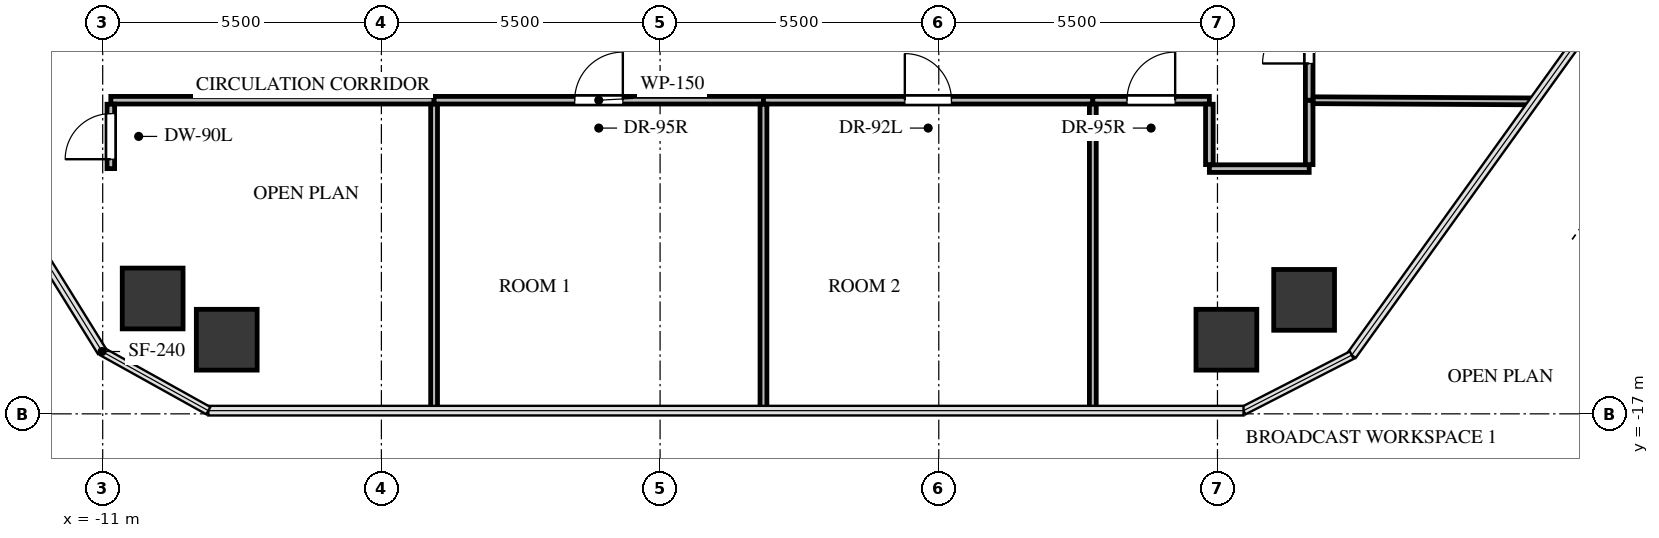
"""IFC4 building model, lengths in metres.
Left out: names, types, materials, properties, quantities, classifications, styles, units other than length and angle.
Written with IfcOpenShell. Run it as: python <this file> out.ifc"""

import sys

from ifc_helpers import new_model, si_unit, direction, frame, frame_2d, origin, origin_2d, place, context, subcontext, project, spatial, rectangle, extrude, source, transform, mapped, element, fill, save


model = new_model("IFC4")
c1 = context("Model", 3, precision=1e-05, world=origin(), true_north=direction((0.0, 1.0)))
c2 = subcontext(c1, "Body", "Model", "MODEL_VIEW")
j1 = project(units=[si_unit("LENGTHUNIT", "METRE"), si_unit("PLANEANGLEUNIT", "RADIAN")], contexts=[c1])
p1 = place(None, origin())
s1 = spatial("IfcSite", under=j1, at=p1, CompositionType="ELEMENT")
p2 = place(p1, origin())
s2 = spatial("IfcBuilding", under=s1, at=p2, CompositionType="ELEMENT")
p3 = place(p2, frame((0.0, 0.0, 114.0)))
s3 = spatial("IfcBuildingStorey", under=s2, at=p3, CompositionType="ELEMENT", Elevation=114.0)
m1 = source(origin(), c2, "Body", "SweptSolid", [
    extrude(rectangle(XDim=1.2, YDim=1.2, at=origin_2d()), origin(), (0.0, 0.0, 1.0), 3.3),
])
for number, where, z_axis, x_axis in (
    (1, (-10.014, -14.723, -0.24), (0.0, 0.0, 1.0), (1.0, 0.0, 0.0)),
    (2, (12.71, -14.75, -0.24), (0.0, 0.0, 1.0), (1.0, 0.0, 0.0)),
    (3, (11.176, -15.537, -0.24), (0.0, 0.0, 1.0), (1.0, 0.0, 0.0)),
    (4, (-8.552, -15.537, -0.24), (0.0, 0.0, 1.0), (1.0, 0.0, 0.0)),
):
    element("IfcColumn", number, at=place(p3, frame(where, z_axis=z_axis, x_axis=x_axis)), inside=s3, PredefinedType="COLUMN", context=c2, shape_type="MappedRepresentation", body=[
        mapped(m1, transform((0.0, 0.0, 0.0), x_axis=(1.0, 0.0, 0.0), y_axis=(0.0, 1.0, 0.0), z_axis=(0.0, 0.0, 1.0), scale=1.0)),
    ])
p4 = place(p3, frame((-10.84, -10.81, 0.0), z_axis=(0.0, 0.0, 1.0), x_axis=(1.0, 0.0, 0.0)))
e5 = element("IfcWall", 5, at=p4, inside=s3, PredefinedType="PARTITIONING", context=c2, shape_type="SweptSolid", body=[
    extrude(rectangle(XDim=6.38, YDim=0.15, at=frame_2d((3.19, 0.0))), origin(), (0.0, 0.0, 1.0), 2.212),
])
p5 = place(p3, frame((-10.84, -12.16, 0.0), z_axis=(0.0, 0.0, 1.0), x_axis=(0.0, 1.0, 0.0)))
e6 = element("IfcWall", 6, at=p5, inside=s3, PredefinedType="PARTITIONING", context=c2, shape_type="SweptSolid", body=[
    extrude(rectangle(XDim=1.271, YDim=0.15, at=frame_2d((0.635, 0.0))), origin(), (0.0, 0.0, 1.0), 3.045),
])
p6 = place(p5, frame((0.186, 0.0, 0.0)))
e7 = element("IfcOpeningElement", 7, at=p6, cuts=e6, PredefinedType="OPENING", context=c2, shape_type="SweptSolid", body=[
    extrude(rectangle(XDim=0.9, YDim=2.05, at=frame_2d((0.45, 1.025))), frame((0.0, 0.085, 0.0), z_axis=(0.0, -1.0, 0.0), x_axis=(1.0, 0.0, 0.0)), (0.0, 0.0, 1.0), 0.17),
])
p7 = place(p3, frame((-4.46, -10.81, 0.0), z_axis=(0.0, 0.0, 1.0), x_axis=(1.0, 0.0, 0.0)))
e8 = element("IfcWall", 8, at=p7, inside=s3, PredefinedType="PARTITIONING", context=c2, shape_type="SweptSolid", body=[
    extrude(rectangle(XDim=6.5, YDim=0.15, at=frame_2d((3.25, 0.0))), origin(), (0.0, 0.0, 1.0), 3.045),
])
p8 = place(p7, frame((2.775, 0.0, 0.0)))
e9 = element("IfcOpeningElement", 9, at=p8, cuts=e8, PredefinedType="OPENING", context=c2, shape_type="SweptSolid", body=[
    extrude(rectangle(XDim=0.95, YDim=2.1, at=frame_2d((0.475, 1.05))), frame((0.0, 0.085, 0.0), z_axis=(0.0, -1.0, 0.0), x_axis=(1.0, 0.0, 0.0)), (0.0, 0.0, 1.0), 0.17),
])
p9 = place(p3, frame((2.04, -10.81, 0.0), z_axis=(0.0, 0.0, 1.0), x_axis=(1.0, 0.0, 0.0)))
e10 = element("IfcWall", 10, at=p9, inside=s3, PredefinedType="PARTITIONING", context=c2, shape_type="SweptSolid", body=[
    extrude(rectangle(XDim=6.5, YDim=0.15, at=frame_2d((3.25, 0.0))), origin(), (0.0, 0.0, 1.0), 2.212),
])
p10 = place(p9, frame((2.79, 0.0, 0.0)))
e11 = element("IfcOpeningElement", 11, at=p10, cuts=e10, PredefinedType="OPENING", context=c2, shape_type="SweptSolid", body=[
    extrude(rectangle(XDim=0.92, YDim=2.1, at=frame_2d((0.46, 1.05))), frame((0.0, 0.085, 0.0), z_axis=(0.0, -1.0, 0.0), x_axis=(1.0, 0.0, 0.0)), (0.0, 0.0, 1.0), 0.17),
])
p11 = place(p3, frame((8.54, -10.81, 0.0), z_axis=(0.0, 0.0, 1.0), x_axis=(1.0, 0.0, 0.0)))
e12 = element("IfcWall", 12, at=p11, inside=s3, PredefinedType="PARTITIONING", context=c2, shape_type="SweptSolid", body=[
    extrude(rectangle(XDim=2.3, YDim=0.15, at=frame_2d((1.15, 0.0))), origin(), (0.0, 0.0, 1.0), 3.045),
])
p12 = place(p11, frame((0.675, 0.0, 0.0)))
e13 = element("IfcOpeningElement", 13, at=p12, cuts=e12, PredefinedType="OPENING", context=c2, shape_type="SweptSolid", body=[
    extrude(rectangle(XDim=0.95, YDim=2.1, at=frame_2d((0.475, 1.05))), frame((0.0, 0.085, 0.0), z_axis=(0.0, -1.0, 0.0), x_axis=(1.0, 0.0, 0.0)), (0.0, 0.0, 1.0), 0.17),
])
p13 = place(p3, frame((10.84, -12.16, 0.0), z_axis=(0.0, 0.0, 1.0), x_axis=(1.0, 0.0, 0.0)))
e14 = element("IfcWall", 14, at=p13, inside=s3, PredefinedType="PARTITIONING", context=c2, shape_type="SweptSolid", body=[
    extrude(rectangle(XDim=1.97, YDim=0.15, at=frame_2d((0.985, 0.0))), origin(), (0.0, 0.0, 1.0), 3.045),
])
p14 = place(p3, frame((10.84, -10.889, 0.0), z_axis=(0.0, 0.0, 1.0), x_axis=(0.0, -1.0, 0.0)))
e15 = element("IfcWall", 15, at=p14, inside=s3, PredefinedType="PARTITIONING", context=c2, shape_type="SweptSolid", body=[
    extrude(rectangle(XDim=1.192, YDim=0.15, at=frame_2d((0.596, 0.0))), origin(), (0.0, 0.0, 1.0), 3.045),
])
p15 = place(p3, frame((12.81, -12.081, 0.0), z_axis=(0.0, 0.0, 1.0), x_axis=(0.0, 1.0, 0.0)))
e16 = element("IfcWall", 16, at=p15, inside=s3, PredefinedType="PARTITIONING", context=c2, shape_type="SweptSolid", body=[
    extrude(rectangle(XDim=1.271, YDim=0.15, at=frame_2d((0.635, 0.0))), origin(), (0.0, 0.0, 1.0), 3.045),
])
p16 = place(p3, frame((12.81, -10.81, 0.0), z_axis=(0.0, 0.0, 1.0), x_axis=(0.0, 1.0, 0.0)))
e17 = element("IfcWall", 17, at=p16, inside=s3, PredefinedType="PARTITIONING", context=c2, shape_type="SweptSolid", body=[
    extrude(rectangle(XDim=2.37, YDim=0.15, at=frame_2d((1.185, 0.0))), origin(), (0.0, 0.0, 1.0), 3.045),
])
p17 = place(p16, frame((0.725, 0.0, 0.0)))
e18 = element("IfcOpeningElement", 18, at=p17, cuts=e17, PredefinedType="OPENING", context=c2, shape_type="SweptSolid", body=[
    extrude(rectangle(XDim=0.92, YDim=2.1, at=frame_2d((0.46, 1.05))), frame((0.0, 0.085, 0.0), z_axis=(0.0, -1.0, 0.0), x_axis=(1.0, 0.0, 0.0)), (0.0, 0.0, 1.0), 0.17),
])
for number, where, z_axis, x_axis in (
    (19, (-4.46, -10.889, 0.0), (0.0, 0.0, 1.0), (0.0, -1.0, 0.0)),
    (20, (2.04, -10.889, 0.0), (0.0, 0.0, 1.0), (0.0, -1.0, 0.0)),
):
    element("IfcWall", number, at=place(p3, frame(where, z_axis=z_axis, x_axis=x_axis)), inside=s3, PredefinedType="PARTITIONING", context=c2, shape_type="SweptSolid", body=[
        extrude(rectangle(XDim=6.048, YDim=0.135, at=frame_2d((3.024, 0.0))), origin(), (0.0, 0.0, 1.0), 2.38),
    ])
p18 = place(p3, frame((8.54, -10.889, 0.0), z_axis=(0.0, 0.0, 1.0), x_axis=(0.0, -1.0, 0.0)))
e21 = element("IfcWall", 21, at=p18, inside=s3, PredefinedType="PARTITIONING", context=c2, shape_type="SweptSolid", body=[
    extrude(rectangle(XDim=6.048, YDim=0.135, at=frame_2d((3.024, 0.0))), origin(), (0.0, 0.0, 1.0), 2.212),
])
p19 = place(p3, frame((12.889, -10.81, 0.0), z_axis=(0.0, 0.0, 1.0), x_axis=(0.999986140562, -0.005264853658, 0.0)))
e22 = element("IfcWall", 22, at=p19, inside=s3, PredefinedType="PARTITIONING", context=c2, shape_type="SweptSolid", body=[
    extrude(rectangle(XDim=4.359, YDim=0.135, at=frame_2d((2.179, 0.0))), origin(), (0.0, 0.0, 1.0), 2.38),
])
m2 = source(origin(), c2, "Body", "SweptSolid", [
    extrude(rectangle(XDim=0.9, YDim=2.05, at=frame_2d((0.45, 1.025))), frame((0.0, 0.025, 0.0), z_axis=(0.0, -1.0, 0.0), x_axis=(1.0, 0.0, 0.0)), (0.0, 0.0, 1.0), 0.05),
])
p20 = place(p6, origin())
e23 = element("IfcDoor", 23, at=p20, inside=s3, OperationType="SINGLE_SWING_LEFT", PredefinedType="DOOR", context=c2, shape_type="MappedRepresentation", body=[
    mapped(m2, transform((0.0, 0.0, 0.0), x_axis=(1.0, 0.0, 0.0), y_axis=(0.0, 1.0, 0.0), z_axis=(0.0, 0.0, 1.0), scale=1.0)),
])
fill(e7, e23)
m3 = source(origin(), c2, "Body", "SweptSolid", [
    extrude(rectangle(XDim=0.95, YDim=2.1, at=frame_2d((0.475, 1.05))), frame((0.0, 0.025, 0.0), z_axis=(0.0, -1.0, 0.0), x_axis=(1.0, 0.0, 0.0)), (0.0, 0.0, 1.0), 0.05),
])
p21 = place(p8, origin())
e24 = element("IfcDoor", 24, at=p21, inside=s3, OperationType="SINGLE_SWING_RIGHT", PredefinedType="DOOR", context=c2, shape_type="MappedRepresentation", body=[
    mapped(m3, transform((0.0, 0.0, 0.0), x_axis=(1.0, 0.0, 0.0), y_axis=(0.0, 1.0, 0.0), z_axis=(0.0, 0.0, 1.0), scale=1.0)),
])
fill(e9, e24)
m4 = source(origin(), c2, "Body", "SweptSolid", [
    extrude(rectangle(XDim=0.92, YDim=2.1, at=frame_2d((0.46, 1.05))), frame((0.0, 0.025, 0.0), z_axis=(0.0, -1.0, 0.0), x_axis=(1.0, 0.0, 0.0)), (0.0, 0.0, 1.0), 0.05),
])
p22 = place(p10, origin())
e25 = element("IfcDoor", 25, at=p22, inside=s3, OperationType="SINGLE_SWING_LEFT", PredefinedType="DOOR", context=c2, shape_type="MappedRepresentation", body=[
    mapped(m4, transform((0.0, 0.0, 0.0), x_axis=(1.0, 0.0, 0.0), y_axis=(0.0, 1.0, 0.0), z_axis=(0.0, 0.0, 1.0), scale=1.0)),
])
fill(e11, e25)
p23 = place(p12, origin())
e26 = element("IfcDoor", 26, at=p23, inside=s3, OperationType="SINGLE_SWING_RIGHT", PredefinedType="DOOR", context=c2, shape_type="MappedRepresentation", body=[
    mapped(m3, transform((0.0, 0.0, 0.0), x_axis=(1.0, 0.0, 0.0), y_axis=(0.0, 1.0, 0.0), z_axis=(0.0, 0.0, 1.0), scale=1.0)),
])
fill(e13, e26)
p24 = place(p17, origin())
e27 = element("IfcDoor", 27, at=p24, inside=s3, OperationType="SINGLE_SWING_LEFT", PredefinedType="DOOR", context=c2, shape_type="MappedRepresentation", body=[
    mapped(m4, transform((0.0, 0.0, 0.0), x_axis=(1.0, 0.0, 0.0), y_axis=(0.0, 1.0, 0.0), z_axis=(0.0, 0.0, 1.0), scale=1.0)),
])
fill(e18, e27)
save(model, sys.argv[1])
